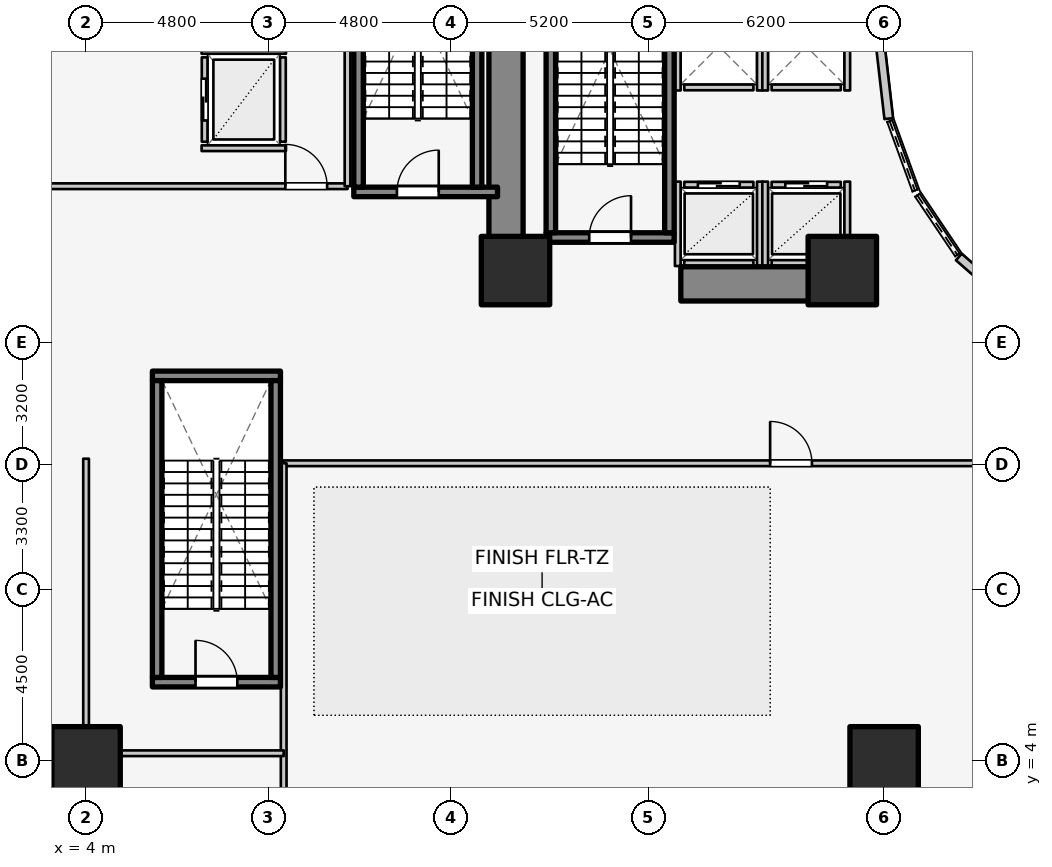
"""IFC4 building model, lengths in metres.
Left out: names, types, materials, properties, quantities, classifications, styles, units other than length and angle.
Written with IfcOpenShell. Run it as: python <this file> out.ifc"""

import sys

from ifc_helpers import new_model, si_unit, direction, frame, frame_2d, origin, origin_2d, place, context, subcontext, project, spatial, rectangle, extrude, element, fill, save


model = new_model("IFC4")
c1 = context("Model", 3, precision=1e-05, world=origin(), true_north=direction((0.0, 1.0)))
c2 = subcontext(c1, "Body", "Model", "MODEL_VIEW")
j1 = project(units=[si_unit("LENGTHUNIT", "METRE"), si_unit("PLANEANGLEUNIT", "RADIAN")], contexts=[c1])
p1 = place(None, origin())
s1 = spatial("IfcSite", under=j1, at=p1, CompositionType="ELEMENT")
p2 = place(p1, origin())
s2 = spatial("IfcBuilding", under=s1, at=p2, CompositionType="ELEMENT")
p3 = place(p2, frame((0.0, 0.0, 4.6)))
s3 = spatial("IfcBuildingStorey", under=s2, at=p3, CompositionType="ELEMENT", Elevation=4.6)
p4 = place(p3, frame((15.05, 17.05, 0.0), z_axis=(0.0, 0.0, 1.0), x_axis=(0.0, 1.0, 0.0)))
e1 = element("IfcWall", 1, at=p4, inside=s3, PredefinedType="SHEAR", context=c2, shape_type="SweptSolid", body=[
    extrude(rectangle(XDim=12.8, YDim=0.9, at=frame_2d((6.4, 0.0))), origin(), (0.0, 0.0, 1.0), 4.6),
])
p5 = place(p3, frame((19.65, 16.55, 0.0), z_axis=(0.0, 0.0, 1.0), x_axis=(1.0, 0.0, 0.0)))
e2 = element("IfcWall", 2, at=p5, inside=s3, PredefinedType="SHEAR", context=c2, shape_type="SweptSolid", body=[
    extrude(rectangle(XDim=4.5, YDim=0.9, at=frame_2d((2.25, 0.0))), origin(), (0.0, 0.0, 1.0), 4.6),
])
p6 = place(p3, frame((16.105, 17.77, 0.0), z_axis=(0.0, 0.0, 1.0), x_axis=(1.0, 0.0, 0.0)))
e3 = element("IfcWall", 3, at=p6, inside=s3, PredefinedType="SOLIDWALL", context=c2, shape_type="SweptSolid", body=[
    extrude(rectangle(XDim=3.37, YDim=0.25, at=frame_2d((1.685, 0.0))), origin(), (0.0, 0.0, 1.0), 4.6),
])
p7 = place(p6, frame((1.135, 0.0, 0.0)))
e4 = element("IfcOpeningElement", 4, at=p7, cuts=e3, PredefinedType="OPENING", context=c2, shape_type="SweptSolid", body=[
    extrude(rectangle(XDim=1.1, YDim=2.1, at=frame_2d((0.55, 1.05))), frame((0.0, 0.135, 0.0), z_axis=(0.0, -1.0, 0.0), x_axis=(1.0, 0.0, 0.0)), (0.0, 0.0, 1.0), 0.27),
])
for number, where, z_axis, x_axis in (
    (5, (16.23, 17.895, 0.0), (0.0, 0.0, 1.0), (0.0, 1.0, 0.0)),
    (6, (19.35, 17.895, 0.0), (0.0, 0.0, 1.0), (0.0, 1.0, 0.0)),
):
    element("IfcWall", number, at=place(p3, frame(where, z_axis=z_axis, x_axis=x_axis)), inside=s3, PredefinedType="SOLIDWALL", context=c2, shape_type="SweptSolid", body=[
        extrude(rectangle(XDim=7.81, YDim=0.25, at=frame_2d((3.905, 0.0))), origin(), (0.0, 0.0, 1.0), 4.6),
    ])
p8 = place(p3, frame((11.045, 18.97, 0.0), z_axis=(0.0, 0.0, 1.0), x_axis=(1.0, 0.0, 0.0)))
e7 = element("IfcWall", 7, at=p8, inside=s3, PredefinedType="SOLIDWALL", context=c2, shape_type="SweptSolid", body=[
    extrude(rectangle(XDim=3.782, YDim=0.25, at=frame_2d((1.891, 0.0))), origin(), (0.0, 0.0, 1.0), 4.6),
])
p9 = place(p8, frame((1.135, 0.0, 0.0)))
e8 = element("IfcOpeningElement", 8, at=p9, cuts=e7, PredefinedType="OPENING", context=c2, shape_type="SweptSolid", body=[
    extrude(rectangle(XDim=1.1, YDim=2.1, at=frame_2d((0.55, 1.05))), frame((0.0, 0.135, 0.0), z_axis=(0.0, -1.0, 0.0), x_axis=(1.0, 0.0, 0.0)), (0.0, 0.0, 1.0), 0.27),
])
for number, where, z_axis, x_axis in (
    (9, (11.17, 19.095, 0.0), (0.0, 0.0, 1.0), (0.0, 1.0, 0.0)),
    (10, (14.29, 19.095, 0.0), (0.0, 0.0, 1.0), (0.0, 1.0, 0.0)),
):
    element("IfcWall", number, at=place(p3, frame(where, z_axis=z_axis, x_axis=x_axis)), inside=s3, PredefinedType="SOLIDWALL", context=c2, shape_type="SweptSolid", body=[
        extrude(rectangle(XDim=7.81, YDim=0.25, at=frame_2d((3.905, 0.0))), origin(), (0.0, 0.0, 1.0), 4.6),
    ])
p10 = place(p3, frame((5.745, 6.07, 0.0), z_axis=(0.0, 0.0, 1.0), x_axis=(1.0, 0.0, 0.0)))
e11 = element("IfcWall", 11, at=p10, inside=s3, PredefinedType="SOLIDWALL", context=c2, shape_type="SweptSolid", body=[
    extrude(rectangle(XDim=3.37, YDim=0.25, at=frame_2d((1.685, 0.0))), origin(), (0.0, 0.0, 1.0), 4.6),
])
p11 = place(p10, frame((1.135, 0.0, 0.0)))
e12 = element("IfcOpeningElement", 12, at=p11, cuts=e11, PredefinedType="OPENING", context=c2, shape_type="SweptSolid", body=[
    extrude(rectangle(XDim=1.1, YDim=2.1, at=frame_2d((0.55, 1.05))), frame((0.0, 0.135, 0.0), z_axis=(0.0, -1.0, 0.0), x_axis=(1.0, 0.0, 0.0)), (0.0, 0.0, 1.0), 0.27),
])
p12 = place(p3, frame((5.745, 14.13, 0.0), z_axis=(0.0, 0.0, 1.0), x_axis=(1.0, 0.0, 0.0)))
e13 = element("IfcWall", 13, at=p12, inside=s3, PredefinedType="SOLIDWALL", context=c2, shape_type="SweptSolid", body=[
    extrude(rectangle(XDim=3.37, YDim=0.25, at=frame_2d((1.685, 0.0))), origin(), (0.0, 0.0, 1.0), 4.6),
])
for number, where, z_axis, x_axis in (
    (14, (5.87, 6.195, 0.0), (0.0, 0.0, 1.0), (0.0, 1.0, 0.0)),
    (15, (8.99, 6.195, 0.0), (0.0, 0.0, 1.0), (0.0, 1.0, 0.0)),
):
    element("IfcWall", number, at=place(p3, frame(where, z_axis=z_axis, x_axis=x_axis)), inside=s3, PredefinedType="SOLIDWALL", context=c2, shape_type="SweptSolid", body=[
        extrude(rectangle(XDim=7.81, YDim=0.25, at=frame_2d((3.905, 0.0))), origin(), (0.0, 0.0, 1.0), 4.6),
    ])
for number, where, z_axis, x_axis in (
    (16, (15.3, 16.9, 0.0), (0.0, 0.0, 1.0), (1.0, 0.0, 0.0)),
    (17, (23.9, 16.9, 0.0), (0.0, 0.0, 1.0), (1.0, 0.0, 0.0)),
    (18, (4.0, 4.0, 0.0), (0.0, 0.0, 1.0), (1.0, 0.0, 0.0)),
    (19, (25.0, 4.0, 0.0), (0.0, 0.0, 1.0), (1.0, 0.0, 0.0)),
):
    element("IfcColumn", number, at=place(p3, frame(where, z_axis=z_axis, x_axis=x_axis)), inside=s3, PredefinedType="COLUMN", context=c2, shape_type="SweptSolid", body=[
        extrude(rectangle(XDim=1.8, YDim=1.8, at=origin_2d()), origin(), (0.0, 0.0, 1.0), 4.6),
    ])
p13 = place(p3, frame((24.88, 23.0, 0.0), z_axis=(0.0, 0.0, 1.0), x_axis=(0.114711713601, -0.993398823617, 0.0)))
e20 = element("IfcWall", 20, at=p13, inside=s3, PredefinedType="STANDARD", context=c2, shape_type="SweptSolid", body=[
    extrude(rectangle(XDim=2.115, YDim=0.23, at=frame_2d((1.058, 0.0))), origin(), (0.0, 0.0, 1.0), 3.28),
])
p14 = place(p3, frame((26.965, 17.258, 0.0), z_axis=(0.0, 0.0, 1.0), x_axis=(0.752576694707, -0.658504607869, 0.0)))
e21 = element("IfcWall", 21, at=p14, inside=s3, PredefinedType="STANDARD", context=c2, shape_type="SweptSolid", body=[
    extrude(rectangle(XDim=1.959, YDim=0.23, at=frame_2d((0.98, 0.0))), origin(), (0.0, 0.0, 1.0), 3.28),
])
p15 = place(p3, frame((19.74, 19.16, 0.0), z_axis=(0.0, 0.0, 1.0), x_axis=(1.0, 0.0, 0.0)))
e22 = element("IfcWall", 22, at=p15, inside=s3, PredefinedType="SOLIDWALL", context=c2, shape_type="SweptSolid", body=[
    extrude(rectangle(XDim=1.82, YDim=0.15, at=frame_2d((0.91, 0.0))), origin(), (0.0, 0.0, 1.0), 4.255),
])
p16 = place(p15, frame((0.36, 0.0, 0.0)))
e23 = element("IfcOpeningElement", 23, at=p16, cuts=e22, PredefinedType="OPENING", context=c2, shape_type="SweptSolid", body=[
    extrude(rectangle(XDim=1.1, YDim=2.1, at=frame_2d((0.55, 1.05))), frame((0.0, 0.085, 0.0), z_axis=(0.0, -1.0, 0.0), x_axis=(1.0, 0.0, 0.0)), (0.0, 0.0, 1.0), 0.17),
])
p17 = place(p3, frame((19.74, 17.1, 0.0), z_axis=(0.0, 0.0, 1.0), x_axis=(1.0, 0.0, 0.0)))
e24 = element("IfcWall", 24, at=p17, inside=s3, PredefinedType="SOLIDWALL", context=c2, shape_type="SweptSolid", body=[
    extrude(rectangle(XDim=1.82, YDim=0.15, at=frame_2d((0.91, 0.0))), origin(), (0.0, 0.0, 1.0), 4.255),
])
p18 = place(p3, frame((19.57, 17.02, 0.0), z_axis=(0.0, 0.0, 1.0), x_axis=(0.0, 1.0, 0.0)))
e25 = element("IfcWall", 25, at=p18, inside=s3, PredefinedType="SOLIDWALL", context=c2, shape_type="SweptSolid", body=[
    extrude(rectangle(XDim=2.22, YDim=0.15, at=frame_2d((1.11, 0.0))), origin(), (0.0, 0.0, 1.0), 3.62),
])
p19 = place(p3, frame((21.73, 17.02, 0.0), z_axis=(0.0, 0.0, 1.0), x_axis=(0.0, 1.0, 0.0)))
e26 = element("IfcWall", 26, at=p19, inside=s3, PredefinedType="SOLIDWALL", context=c2, shape_type="SweptSolid", body=[
    extrude(rectangle(XDim=2.22, YDim=0.15, at=frame_2d((1.11, 0.0))), origin(), (0.0, 0.0, 1.0), 4.255),
])
p20 = place(p3, frame((22.04, 19.16, 0.0), z_axis=(0.0, 0.0, 1.0), x_axis=(1.0, 0.0, 0.0)))
e27 = element("IfcWall", 27, at=p20, inside=s3, PredefinedType="SOLIDWALL", context=c2, shape_type="SweptSolid", body=[
    extrude(rectangle(XDim=1.82, YDim=0.15, at=frame_2d((0.91, 0.0))), origin(), (0.0, 0.0, 1.0), 3.62),
])
p21 = place(p20, frame((0.36, 0.0, 0.0)))
e28 = element("IfcOpeningElement", 28, at=p21, cuts=e27, PredefinedType="OPENING", context=c2, shape_type="SweptSolid", body=[
    extrude(rectangle(XDim=1.1, YDim=2.1, at=frame_2d((0.55, 1.05))), frame((0.0, 0.085, 0.0), z_axis=(0.0, -1.0, 0.0), x_axis=(1.0, 0.0, 0.0)), (0.0, 0.0, 1.0), 0.17),
])
p22 = place(p3, frame((22.04, 17.1, 0.0), z_axis=(0.0, 0.0, 1.0), x_axis=(1.0, 0.0, 0.0)))
e29 = element("IfcWall", 29, at=p22, inside=s3, PredefinedType="SOLIDWALL", context=c2, shape_type="SweptSolid", body=[
    extrude(rectangle(XDim=1.82, YDim=0.15, at=frame_2d((0.91, 0.0))), origin(), (0.0, 0.0, 1.0), 3.62),
])
p23 = place(p3, frame((21.87, 17.02, 0.0), z_axis=(0.0, 0.0, 1.0), x_axis=(0.0, 1.0, 0.0)))
e30 = element("IfcWall", 30, at=p23, inside=s3, PredefinedType="SOLIDWALL", context=c2, shape_type="SweptSolid", body=[
    extrude(rectangle(XDim=2.22, YDim=0.15, at=frame_2d((1.11, 0.0))), origin(), (0.0, 0.0, 1.0), 4.255),
])
p24 = place(p3, frame((24.03, 17.02, 0.0), z_axis=(0.0, 0.0, 1.0), x_axis=(0.0, 1.0, 0.0)))
e31 = element("IfcWall", 31, at=p24, inside=s3, PredefinedType="SOLIDWALL", context=c2, shape_type="SweptSolid", body=[
    extrude(rectangle(XDim=2.22, YDim=0.15, at=frame_2d((1.11, 0.0))), origin(), (0.0, 0.0, 1.0), 3.3),
])
p25 = place(p3, frame((19.74, 21.72, 0.0), z_axis=(0.0, 0.0, 1.0), x_axis=(1.0, 0.0, 0.0)))
e32 = element("IfcWall", 32, at=p25, inside=s3, PredefinedType="SOLIDWALL", context=c2, shape_type="SweptSolid", body=[
    extrude(rectangle(XDim=1.82, YDim=0.15, at=frame_2d((0.91, 0.0))), origin(), (0.0, 0.0, 1.0), 4.255),
])
for number, where, z_axis, x_axis in (
    (33, (19.57, 21.64, 0.0), (0.0, 0.0, 1.0), (0.0, 1.0, 0.0)),
    (34, (21.73, 21.64, 0.0), (0.0, 0.0, 1.0), (0.0, 1.0, 0.0)),
):
    element("IfcWall", number, at=place(p3, frame(where, z_axis=z_axis, x_axis=x_axis)), inside=s3, PredefinedType="SOLIDWALL", context=c2, shape_type="SweptSolid", body=[
        extrude(rectangle(XDim=2.32, YDim=0.15, at=frame_2d((1.16, 0.0))), origin(), (0.0, 0.0, 1.0), 4.255),
    ])
p26 = place(p3, frame((22.04, 21.72, 0.0), z_axis=(0.0, 0.0, 1.0), x_axis=(1.0, 0.0, 0.0)))
e35 = element("IfcWall", 35, at=p26, inside=s3, PredefinedType="SOLIDWALL", context=c2, shape_type="SweptSolid", body=[
    extrude(rectangle(XDim=1.82, YDim=0.15, at=frame_2d((0.91, 0.0))), origin(), (0.0, 0.0, 1.0), 3.62),
])
p27 = place(p3, frame((21.87, 21.64, 0.0), z_axis=(0.0, 0.0, 1.0), x_axis=(0.0, 1.0, 0.0)))
e36 = element("IfcWall", 36, at=p27, inside=s3, PredefinedType="SOLIDWALL", context=c2, shape_type="SweptSolid", body=[
    extrude(rectangle(XDim=2.32, YDim=0.15, at=frame_2d((1.16, 0.0))), origin(), (0.0, 0.0, 1.0), 4.255),
])
p28 = place(p3, frame((24.03, 21.64, 0.0), z_axis=(0.0, 0.0, 1.0), x_axis=(0.0, 1.0, 0.0)))
e37 = element("IfcWall", 37, at=p28, inside=s3, PredefinedType="SOLIDWALL", context=c2, shape_type="SweptSolid", body=[
    extrude(rectangle(XDim=2.32, YDim=0.15, at=frame_2d((1.16, 0.0))), origin(), (0.0, 0.0, 1.0), 3.62),
])
p29 = place(p3, frame((7.12, 20.29, 0.0), z_axis=(0.0, 0.0, 1.0), x_axis=(0.0, 1.0, 0.0)))
e38 = element("IfcWall", 38, at=p29, inside=s3, PredefinedType="SOLIDWALL", context=c2, shape_type="SweptSolid", body=[
    extrude(rectangle(XDim=2.22, YDim=0.15, at=frame_2d((1.11, 0.0))), origin(), (0.0, 0.0, 1.0), 4.255),
])
p30 = place(p29, frame((0.56, 0.0, 0.0)))
e39 = element("IfcOpeningElement", 39, at=p30, cuts=e38, PredefinedType="OPENING", context=c2, shape_type="SweptSolid", body=[
    extrude(rectangle(XDim=1.1, YDim=2.1, at=frame_2d((0.55, 1.05))), frame((0.0, 0.085, 0.0), z_axis=(0.0, -1.0, 0.0), x_axis=(1.0, 0.0, 0.0)), (0.0, 0.0, 1.0), 0.17),
])
for number, where, z_axis, x_axis in (
    (40, (9.18, 20.29, 0.0), (0.0, 0.0, 1.0), (0.0, 1.0, 0.0)),
    (41, (7.04, 20.12, 0.0), (0.0, 0.0, 1.0), (1.0, 0.0, 0.0)),
    (42, (7.04, 22.68, 0.0), (0.0, 0.0, 1.0), (1.0, 0.0, 0.0)),
):
    element("IfcWall", number, at=place(p3, frame(where, z_axis=z_axis, x_axis=x_axis)), inside=s3, PredefinedType="SOLIDWALL", context=c2, shape_type="SweptSolid", body=[
        extrude(rectangle(XDim=2.22, YDim=0.15, at=frame_2d((1.11, 0.0))), origin(), (0.0, 0.0, 1.0), 4.255),
    ])
p31 = place(p3, frame((9.2, 11.83, 0.0), z_axis=(0.0, 0.0, 1.0), x_axis=(1.0, 0.0, 0.0)))
e43 = element("IfcWall", 43, at=p31, inside=s3, PredefinedType="PARTITIONING", context=c2, shape_type="SweptSolid", body=[
    extrude(rectangle(XDim=45.6, YDim=0.15, at=frame_2d((22.8, 0.0))), origin(), (0.0, 0.0, 1.0), 3.3),
])
p32 = place(p31, frame((12.8, 0.0, 0.0)))
e44 = element("IfcOpeningElement", 44, at=p32, cuts=e43, PredefinedType="OPENING", context=c2, shape_type="SweptSolid", body=[
    extrude(rectangle(XDim=1.1, YDim=2.1, at=frame_2d((0.55, 1.05))), frame((0.0, 0.085, 0.0), z_axis=(0.0, -1.0, 0.0), x_axis=(1.0, 0.0, 0.0)), (0.0, 0.0, 1.0), 0.17),
])
p33 = place(p31, frame((35.6, 0.0, 0.0)))
e45 = element("IfcOpeningElement", 45, at=p33, cuts=e43, PredefinedType="OPENING", context=c2, shape_type="SweptSolid", body=[
    extrude(rectangle(XDim=1.1, YDim=2.1, at=frame_2d((0.55, 1.05))), frame((0.0, 0.085, 0.0), z_axis=(0.0, -1.0, 0.0), x_axis=(1.0, 0.0, 0.0)), (0.0, 0.0, 1.0), 0.17),
])
p34 = place(p3, frame((9.2, 0.25, 0.0), z_axis=(0.0, 0.0, 1.0), x_axis=(0.0, 1.0, 0.0)))
e46 = element("IfcWall", 46, at=p34, inside=s3, PredefinedType="PARTITIONING", context=c2, shape_type="SweptSolid", body=[
    extrude(rectangle(XDim=11.58, YDim=0.15, at=frame_2d((5.79, 0.0))), origin(), (0.0, 0.0, 1.0), 3.3),
])
p35 = place(p3, frame((4.0, 4.2, 0.0), z_axis=(0.0, 0.0, 1.0), x_axis=(0.0, 1.0, 0.0)))
e47 = element("IfcWall", 47, at=p35, inside=s3, PredefinedType="PARTITIONING", context=c2, shape_type="SweptSolid", body=[
    extrude(rectangle(XDim=7.75, YDim=0.15, at=frame_2d((3.875, 0.0))), origin(), (0.0, 0.0, 1.0), 3.3),
])
p36 = place(p3, frame((4.0, 4.2, 0.0), z_axis=(0.0, 0.0, 1.0), x_axis=(1.0, 0.0, 0.0)))
e48 = element("IfcWall", 48, at=p36, inside=s3, PredefinedType="PARTITIONING", context=c2, shape_type="SweptSolid", body=[
    extrude(rectangle(XDim=5.2, YDim=0.15, at=frame_2d((2.6, 0.0))), origin(), (0.0, 0.0, 1.0), 3.3),
])
p37 = place(p3, frame((0.25, 19.12, 0.0), z_axis=(0.0, 0.0, 1.0), x_axis=(1.0, 0.0, 0.0)))
e49 = element("IfcWall", 49, at=p37, inside=s3, PredefinedType="PARTITIONING", context=c2, shape_type="SweptSolid", body=[
    extrude(rectangle(XDim=10.63, YDim=0.15, at=frame_2d((5.315, 0.0))), origin(), (0.0, 0.0, 1.0), 3.3),
])
p38 = place(p37, frame((8.993, 0.0, 0.0)))
e50 = element("IfcOpeningElement", 50, at=p38, cuts=e49, PredefinedType="OPENING", context=c2, shape_type="SweptSolid", body=[
    extrude(rectangle(XDim=1.1, YDim=2.1, at=frame_2d((0.55, 1.05))), frame((0.0, 0.085, 0.0), z_axis=(0.0, -1.0, 0.0), x_axis=(1.0, 0.0, 0.0)), (0.0, 0.0, 1.0), 0.17),
])
p39 = place(p3, frame((10.88, 19.12, 0.0), z_axis=(0.0, 0.0, 1.0), x_axis=(0.0, 1.0, 0.0)))
e51 = element("IfcWall", 51, at=p39, inside=s3, PredefinedType="PARTITIONING", context=c2, shape_type="SweptSolid", body=[
    extrude(rectangle(XDim=11.08, YDim=0.15, at=frame_2d((5.54, 0.0))), origin(), (0.0, 0.0, 1.0), 3.62),
])
p40 = place(p7, origin())
e52 = element("IfcDoor", 52, at=p40, inside=s3, OperationType="SINGLE_SWING_RIGHT", PredefinedType="DOOR", context=c2, shape_type="SweptSolid", body=[
    extrude(rectangle(XDim=1.1, YDim=2.1, at=frame_2d((0.55, 1.05))), frame((0.0, 0.025, 0.0), z_axis=(0.0, -1.0, 0.0), x_axis=(1.0, 0.0, 0.0)), (0.0, 0.0, 1.0), 0.05),
])
fill(e4, e52)
p41 = place(p9, origin())
e53 = element("IfcDoor", 53, at=p41, inside=s3, OperationType="SINGLE_SWING_RIGHT", PredefinedType="DOOR", context=c2, shape_type="SweptSolid", body=[
    extrude(rectangle(XDim=1.1, YDim=2.1, at=frame_2d((0.55, 1.05))), frame((0.0, 0.025, 0.0), z_axis=(0.0, -1.0, 0.0), x_axis=(1.0, 0.0, 0.0)), (0.0, 0.0, 1.0), 0.05),
])
fill(e8, e53)
p42 = place(p11, origin())
e54 = element("IfcDoor", 54, at=p42, inside=s3, OperationType="SINGLE_SWING_LEFT", PredefinedType="DOOR", context=c2, shape_type="SweptSolid", body=[
    extrude(rectangle(XDim=1.1, YDim=2.1, at=frame_2d((0.55, 1.05))), frame((0.0, 0.025, 0.0), z_axis=(0.0, -1.0, 0.0), x_axis=(1.0, 0.0, 0.0)), (0.0, 0.0, 1.0), 0.05),
])
fill(e12, e54)
p43 = place(p16, origin())
e55 = element("IfcDoor", 55, at=p43, inside=s3, OperationType="DOUBLE_DOOR_SLIDING", PredefinedType="DOOR", context=c2, shape_type="SweptSolid", body=[
    extrude(rectangle(XDim=1.1, YDim=2.1, at=frame_2d((0.55, 1.05))), frame((0.0, 0.025, 0.0), z_axis=(0.0, -1.0, 0.0), x_axis=(1.0, 0.0, 0.0)), (0.0, 0.0, 1.0), 0.05),
])
fill(e23, e55)
p44 = place(p21, origin())
e56 = element("IfcDoor", 56, at=p44, inside=s3, OperationType="DOUBLE_DOOR_SLIDING", PredefinedType="DOOR", context=c2, shape_type="SweptSolid", body=[
    extrude(rectangle(XDim=1.1, YDim=2.1, at=frame_2d((0.55, 1.05))), frame((0.0, 0.025, 0.0), z_axis=(0.0, -1.0, 0.0), x_axis=(1.0, 0.0, 0.0)), (0.0, 0.0, 1.0), 0.05),
])
fill(e28, e56)
p45 = place(p30, origin())
e57 = element("IfcDoor", 57, at=p45, inside=s3, OperationType="DOUBLE_DOOR_SLIDING", PredefinedType="DOOR", context=c2, shape_type="SweptSolid", body=[
    extrude(rectangle(XDim=1.1, YDim=2.1, at=frame_2d((0.55, 1.05))), frame((0.0, 0.025, 0.0), z_axis=(0.0, -1.0, 0.0), x_axis=(1.0, 0.0, 0.0)), (0.0, 0.0, 1.0), 0.05),
])
fill(e39, e57)
p46 = place(p32, origin())
e58 = element("IfcDoor", 58, at=p46, inside=s3, OperationType="SINGLE_SWING_LEFT", PredefinedType="DOOR", context=c2, shape_type="SweptSolid", body=[
    extrude(rectangle(XDim=1.1, YDim=2.1, at=frame_2d((0.55, 1.05))), frame((0.0, 0.025, 0.0), z_axis=(0.0, -1.0, 0.0), x_axis=(1.0, 0.0, 0.0)), (0.0, 0.0, 1.0), 0.05),
])
fill(e44, e58)
p47 = place(p38, origin())
e59 = element("IfcDoor", 59, at=p47, inside=s3, OperationType="SINGLE_SWING_LEFT", PredefinedType="DOOR", context=c2, shape_type="SweptSolid", body=[
    extrude(rectangle(XDim=1.1, YDim=2.1, at=frame_2d((0.55, 1.05))), frame((0.0, 0.025, 0.0), z_axis=(0.0, -1.0, 0.0), x_axis=(1.0, 0.0, 0.0)), (0.0, 0.0, 1.0), 0.05),
])
fill(e50, e59)
save(model, sys.argv[1])
